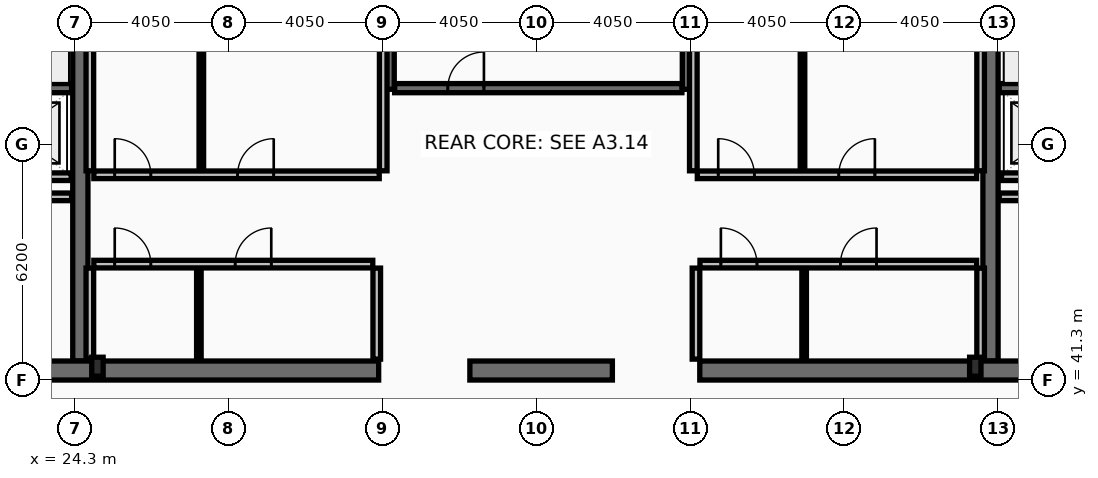
"""IFC4 building model, lengths in metres.
Left out: names, types, materials, properties, quantities, classifications, styles, units other than length and angle.
Written with IfcOpenShell. Run it as: python <this file> out.ifc"""

import sys

from ifc_helpers import new_model, si_unit, direction, frame, frame_2d, origin, origin_2d, place, context, subcontext, project, spatial, rectangle, i_section, extrude, element, fill, save


model = new_model("IFC4")
c1 = context("Model", 3, precision=1e-05, world=origin(), true_north=direction((0.0, 1.0)))
c2 = subcontext(c1, "Body", "Model", "MODEL_VIEW")
j1 = project(units=[si_unit("LENGTHUNIT", "METRE"), si_unit("PLANEANGLEUNIT", "RADIAN")], contexts=[c1])
p1 = place(None, origin())
s1 = spatial("IfcSite", under=j1, at=p1, CompositionType="ELEMENT")
p2 = place(p1, origin())
s2 = spatial("IfcBuilding", under=s1, at=p2, CompositionType="ELEMENT")
p3 = place(p2, frame((0.0, 0.0, 361.8)))
s3 = spatial("IfcBuildingStorey", under=s2, at=p3, CompositionType="ELEMENT", Elevation=361.8)
for number, where, z_axis, x_axis in (
    (1, (24.45, 41.8, 0.0), (0.0, 0.0, 1.0), (0.0, 1.0, 0.0)),
    (2, (48.4, 41.8, 0.0), (0.0, 0.0, 1.0), (0.0, 1.0, 0.0)),
):
    element("IfcWall", number, at=place(p3, frame(where, z_axis=z_axis, x_axis=x_axis)), inside=s3, PredefinedType="SHEAR", context=c2, shape_type="SweptSolid", body=[
        extrude(rectangle(XDim=11.4, YDim=0.4, at=frame_2d((5.7, 0.0))), origin(), (0.0, 0.0, 1.0), 5.4),
    ])
p4 = place(p3, frame((32.3, 41.55, 0.0), z_axis=(0.0, 0.0, 1.0), x_axis=(-1.0, 0.0, 0.0)))
e3 = element("IfcWall", 3, at=p4, inside=s3, PredefinedType="SHEAR", context=c2, shape_type="SweptSolid", body=[
    extrude(rectangle(XDim=11.45, YDim=0.5, at=frame_2d((5.725, 0.0))), origin(), (0.0, 0.0, 1.0), 5.4),
])
p5 = place(p3, frame((38.45, 41.55, 0.0), z_axis=(0.0, 0.0, 1.0), x_axis=(-1.0, 0.0, 0.0)))
e4 = element("IfcWall", 4, at=p5, inside=s3, PredefinedType="SHEAR", context=c2, shape_type="SweptSolid", body=[
    extrude(rectangle(XDim=3.75, YDim=0.5, at=frame_2d((1.875, 0.0))), origin(), (0.0, 0.0, 1.0), 5.4),
])
p6 = place(p3, frame((52.05, 41.55, 0.0), z_axis=(0.0, 0.0, 1.0), x_axis=(-1.0, 0.0, 0.0)))
e5 = element("IfcWall", 5, at=p6, inside=s3, PredefinedType="SHEAR", context=c2, shape_type="SweptSolid", body=[
    extrude(rectangle(XDim=11.3, YDim=0.5, at=frame_2d((5.65, 0.0))), origin(), (0.0, 0.0, 1.0), 5.4),
])
for number, where, z_axis, x_axis in (
    (6, (32.58, 48.95, 0.0), (0.0, 0.0, 1.0), (0.0, 1.0, 0.0)),
    (7, (40.42, 48.95, 0.0), (0.0, 0.0, 1.0), (0.0, 1.0, 0.0)),
):
    element("IfcWall", number, at=place(p3, frame(where, z_axis=z_axis, x_axis=x_axis)), inside=s3, PredefinedType="SHEAR", context=c2, shape_type="SweptSolid", body=[
        extrude(rectangle(XDim=4.25, YDim=0.26, at=frame_2d((2.125, 0.0))), origin(), (0.0, 0.0, 1.0), 5.4),
    ])
p7 = place(p3, frame((16.7, 48.98, 0.0), z_axis=(0.0, 0.0, 1.0), x_axis=(1.0, 0.0, 0.0)))
e8 = element("IfcWall", 8, at=p7, inside=s3, PredefinedType="SHEAR", context=c2, shape_type="SweptSolid", body=[
    extrude(rectangle(XDim=7.52, YDim=0.24, at=frame_2d((3.76, 0.0))), origin(), (0.0, 0.0, 1.0), 5.4),
])
p8 = place(p7, frame((0.22, 0.0, 0.0)))
e9 = element("IfcOpeningElement", 9, at=p8, cuts=e8, PredefinedType="OPENING", context=c2, shape_type="SweptSolid", body=[
    extrude(rectangle(XDim=1.05, YDim=2.15, at=frame_2d((0.525, 1.075))), frame((0.0, 0.13, 0.0), z_axis=(0.0, -1.0, 0.0), x_axis=(1.0, 0.0, 0.0)), (0.0, 0.0, 1.0), 0.26),
])
p9 = place(p3, frame((48.63, 48.98, 0.0), z_axis=(0.0, 0.0, 1.0), x_axis=(1.0, 0.0, 0.0)))
e10 = element("IfcWall", 10, at=p9, inside=s3, PredefinedType="SHEAR", context=c2, shape_type="SweptSolid", body=[
    extrude(rectangle(XDim=7.57, YDim=0.24, at=frame_2d((3.785, 0.0))), origin(), (0.0, 0.0, 1.0), 5.4),
])
p10 = place(p9, frame((6.3, 0.0, 0.0)))
e11 = element("IfcOpeningElement", 11, at=p10, cuts=e10, PredefinedType="OPENING", context=c2, shape_type="SweptSolid", body=[
    extrude(rectangle(XDim=1.05, YDim=2.15, at=frame_2d((0.525, 1.075))), frame((0.0, 0.13, 0.0), z_axis=(0.0, -1.0, 0.0), x_axis=(1.0, 0.0, 0.0)), (0.0, 0.0, 1.0), 0.26),
])
p11 = place(p3, frame((32.72, 48.98, 0.0), z_axis=(0.0, 0.0, 1.0), x_axis=(1.0, 0.0, 0.0)))
e12 = element("IfcWall", 12, at=p11, inside=s3, PredefinedType="SHEAR", context=c2, shape_type="SweptSolid", body=[
    extrude(rectangle(XDim=7.56, YDim=0.24, at=frame_2d((3.78, 0.0))), origin(), (0.0, 0.0, 1.0), 5.4),
])
p12 = place(p11, frame((1.4, 0.0, 0.0)))
e13 = element("IfcOpeningElement", 13, at=p12, cuts=e12, PredefinedType="OPENING", context=c2, shape_type="SweptSolid", body=[
    extrude(rectangle(XDim=0.95, YDim=2.1, at=frame_2d((0.475, 1.05))), frame((0.0, 0.13, 0.0), z_axis=(0.0, -1.0, 0.0), x_axis=(1.0, 0.0, 0.0)), (0.0, 0.0, 1.0), 0.26),
])
for number, where, z_axis, x_axis in (
    (14, (24.9, 41.65, 0.0), (0.0, 0.0, 1.0), (1.0, 0.0, 0.0)),
    (15, (48.0, 41.65, 0.0), (0.0, 0.0, 1.0), (1.0, 0.0, 0.0)),
):
    element("IfcColumn", number, at=place(p3, frame(where, z_axis=z_axis, x_axis=x_axis)), inside=s3, PredefinedType="COLUMN", context=c2, shape_type="SweptSolid", body=[
        extrude(i_section(OverallWidth=0.3, OverallDepth=0.5, WebThickness=0.014, FlangeThickness=0.028, at=origin_2d()), origin(), (0.0, 0.0, 1.0), 5.6),
    ])
p13 = place(p3, frame((51.61, 46.65, 0.0), z_axis=(0.0, 0.0, 1.0), x_axis=(-1.0, 0.0, 0.0)))
e16 = element("IfcWall", 16, at=p13, inside=s3, PredefinedType="PARTITIONING", context=c2, shape_type="SweptSolid", body=[
    extrude(rectangle(XDim=2.92, YDim=0.2, at=frame_2d((1.46, 0.0))), origin(), (0.0, 0.0, 1.0), 5.4),
])
p14 = place(p13, frame((0.86, 0.0, 0.0)))
e17 = element("IfcOpeningElement", 17, at=p14, cuts=e16, PredefinedType="OPENING", context=c2, shape_type="SweptSolid", body=[
    extrude(rectangle(XDim=1.2, YDim=2.18, at=frame_2d((0.6, 1.09))), frame((0.0, 0.11, 0.0), z_axis=(0.0, -1.0, 0.0), x_axis=(1.0, 0.0, 0.0)), (0.0, 0.0, 1.0), 0.22),
])
p15 = place(p3, frame((24.21, 46.65, 0.0), z_axis=(0.0, 0.0, 1.0), x_axis=(-1.0, 0.0, 0.0)))
e18 = element("IfcWall", 18, at=p15, inside=s3, PredefinedType="PARTITIONING", context=c2, shape_type="SweptSolid", body=[
    extrude(rectangle(XDim=2.97, YDim=0.2, at=frame_2d((1.485, 0.0))), origin(), (0.0, 0.0, 1.0), 5.4),
])
p16 = place(p15, frame((0.91, 0.0, 0.0)))
e19 = element("IfcOpeningElement", 19, at=p16, cuts=e18, PredefinedType="OPENING", context=c2, shape_type="SweptSolid", body=[
    extrude(rectangle(XDim=1.2, YDim=2.18, at=frame_2d((0.6, 1.09))), frame((0.0, 0.11, 0.0), z_axis=(0.0, -1.0, 0.0), x_axis=(1.0, 0.0, 0.0)), (0.0, 0.0, 1.0), 0.22),
])
p17 = place(p3, frame((21.2, 46.12, 0.0), z_axis=(0.0, 0.0, 1.0), x_axis=(1.0, 0.0, 0.0)))
e20 = element("IfcWall", 20, at=p17, inside=s3, PredefinedType="PARTITIONING", context=c2, shape_type="SweptSolid", body=[
    extrude(rectangle(XDim=3.02, YDim=0.2, at=frame_2d((1.51, 0.0))), origin(), (0.0, 0.0, 1.0), 5.4),
])
p18 = place(p3, frame((48.63, 46.12, 0.0), z_axis=(0.0, 0.0, 1.0), x_axis=(1.0, 0.0, 0.0)))
e21 = element("IfcWall", 21, at=p18, inside=s3, PredefinedType="PARTITIONING", context=c2, shape_type="SweptSolid", body=[
    extrude(rectangle(XDim=3.07, YDim=0.2, at=frame_2d((1.535, 0.0))), origin(), (0.0, 0.0, 1.0), 5.4),
])
for number, where, z_axis, x_axis in (
    (22, (24.7, 46.805, 0.0), (0.0, 0.0, 1.0), (0.0, 1.0, 0.0)),
    (23, (32.42, 46.805, 0.0), (0.0, 0.0, 1.0), (0.0, 1.0, 0.0)),
):
    element("IfcWall", number, at=place(p3, frame(where, z_axis=z_axis, x_axis=x_axis)), inside=s3, PredefinedType="PARTITIONING", context=c2, shape_type="SweptSolid", body=[
        extrude(rectangle(XDim=5.99, YDim=0.2, at=frame_2d((2.995, 0.0))), origin(), (0.0, 0.0, 1.0), 5.4),
    ])
p19 = place(p3, frame((27.634, 46.805, 0.0), z_axis=(0.0, 0.0, 1.0), x_axis=(0.0, 1.0, 0.0)))
e24 = element("IfcWall", 24, at=p19, inside=s3, PredefinedType="PARTITIONING", context=c2, shape_type="SweptSolid", body=[
    extrude(rectangle(XDim=5.99, YDim=0.12, at=frame_2d((2.995, 0.0))), origin(), (0.0, 0.0, 1.0), 5.4),
])
p20 = place(p3, frame((24.805, 46.7, 0.0), z_axis=(0.0, 0.0, 1.0), x_axis=(1.0, 0.0, 0.0)))
e25 = element("IfcWall", 25, at=p20, inside=s3, PredefinedType="PARTITIONING", context=c2, shape_type="SweptSolid", body=[
    extrude(rectangle(XDim=7.51, YDim=0.2, at=frame_2d((3.755, 0.0))), origin(), (0.0, 0.0, 1.0), 5.4),
])
p21 = place(p20, frame((0.55, 0.0, 0.0)))
e26 = element("IfcOpeningElement", 26, at=p21, cuts=e25, PredefinedType="OPENING", context=c2, shape_type="SweptSolid", body=[
    extrude(rectangle(XDim=0.95, YDim=2.1, at=frame_2d((0.475, 1.05))), frame((0.0, 0.11, 0.0), z_axis=(0.0, -1.0, 0.0), x_axis=(1.0, 0.0, 0.0)), (0.0, 0.0, 1.0), 0.22),
])
p22 = place(p20, frame((3.784, 0.0, 0.0)))
e27 = element("IfcOpeningElement", 27, at=p22, cuts=e25, PredefinedType="OPENING", context=c2, shape_type="SweptSolid", body=[
    extrude(rectangle(XDim=0.95, YDim=2.1, at=frame_2d((0.475, 1.05))), frame((0.0, 0.11, 0.0), z_axis=(0.0, -1.0, 0.0), x_axis=(1.0, 0.0, 0.0)), (0.0, 0.0, 1.0), 0.22),
])
for number, where, z_axis, x_axis in (
    (28, (24.7, 41.85, 0.0), (0.0, 0.0, 1.0), (0.0, 1.0, 0.0)),
    (29, (32.25, 41.85, 0.0), (0.0, 0.0, 1.0), (0.0, 1.0, 0.0)),
):
    element("IfcWall", number, at=place(p3, frame(where, z_axis=z_axis, x_axis=x_axis)), inside=s3, PredefinedType="PARTITIONING", context=c2, shape_type="SweptSolid", body=[
        extrude(rectangle(XDim=2.395, YDim=0.2, at=frame_2d((1.198, 0.0))), origin(), (0.0, 0.0, 1.0), 5.4),
    ])
p23 = place(p3, frame((27.569, 41.85, 0.0), z_axis=(0.0, 0.0, 1.0), x_axis=(0.0, 1.0, 0.0)))
e30 = element("IfcWall", 30, at=p23, inside=s3, PredefinedType="PARTITIONING", context=c2, shape_type="SweptSolid", body=[
    extrude(rectangle(XDim=2.395, YDim=0.12, at=frame_2d((1.198, 0.0))), origin(), (0.0, 0.0, 1.0), 5.4),
])
p24 = place(p3, frame((24.805, 44.35, 0.0), z_axis=(0.0, 0.0, 1.0), x_axis=(1.0, 0.0, 0.0)))
e31 = element("IfcWall", 31, at=p24, inside=s3, PredefinedType="PARTITIONING", context=c2, shape_type="SweptSolid", body=[
    extrude(rectangle(XDim=7.34, YDim=0.2, at=frame_2d((3.67, 0.0))), origin(), (0.0, 0.0, 1.0), 5.4),
])
p25 = place(p24, frame((0.55, 0.0, 0.0)))
e32 = element("IfcOpeningElement", 32, at=p25, cuts=e31, PredefinedType="OPENING", context=c2, shape_type="SweptSolid", body=[
    extrude(rectangle(XDim=0.95, YDim=2.1, at=frame_2d((0.475, 1.05))), frame((0.0, 0.11, 0.0), z_axis=(0.0, -1.0, 0.0), x_axis=(1.0, 0.0, 0.0)), (0.0, 0.0, 1.0), 0.22),
])
p26 = place(p24, frame((3.719, 0.0, 0.0)))
e33 = element("IfcOpeningElement", 33, at=p26, cuts=e31, PredefinedType="OPENING", context=c2, shape_type="SweptSolid", body=[
    extrude(rectangle(XDim=0.95, YDim=2.1, at=frame_2d((0.475, 1.05))), frame((0.0, 0.11, 0.0), z_axis=(0.0, -1.0, 0.0), x_axis=(1.0, 0.0, 0.0)), (0.0, 0.0, 1.0), 0.22),
])
for number, where, z_axis, x_axis in (
    (34, (40.58, 46.805, 0.0), (0.0, 0.0, 1.0), (0.0, 1.0, 0.0)),
    (35, (48.14, 46.805, 0.0), (0.0, 0.0, 1.0), (0.0, 1.0, 0.0)),
):
    element("IfcWall", number, at=place(p3, frame(where, z_axis=z_axis, x_axis=x_axis)), inside=s3, PredefinedType="PARTITIONING", context=c2, shape_type="SweptSolid", body=[
        extrude(rectangle(XDim=5.99, YDim=0.2, at=frame_2d((2.995, 0.0))), origin(), (0.0, 0.0, 1.0), 5.4),
    ])
p27 = place(p3, frame((43.453, 46.805, 0.0), z_axis=(0.0, 0.0, 1.0), x_axis=(0.0, 1.0, 0.0)))
e36 = element("IfcWall", 36, at=p27, inside=s3, PredefinedType="PARTITIONING", context=c2, shape_type="SweptSolid", body=[
    extrude(rectangle(XDim=5.99, YDim=0.12, at=frame_2d((2.995, 0.0))), origin(), (0.0, 0.0, 1.0), 5.4),
])
p28 = place(p3, frame((40.685, 46.7, 0.0), z_axis=(0.0, 0.0, 1.0), x_axis=(1.0, 0.0, 0.0)))
e37 = element("IfcWall", 37, at=p28, inside=s3, PredefinedType="PARTITIONING", context=c2, shape_type="SweptSolid", body=[
    extrude(rectangle(XDim=7.35, YDim=0.2, at=frame_2d((3.675, 0.0))), origin(), (0.0, 0.0, 1.0), 5.4),
])
p29 = place(p28, frame((0.55, 0.0, 0.0)))
e38 = element("IfcOpeningElement", 38, at=p29, cuts=e37, PredefinedType="OPENING", context=c2, shape_type="SweptSolid", body=[
    extrude(rectangle(XDim=0.95, YDim=2.1, at=frame_2d((0.475, 1.05))), frame((0.0, 0.11, 0.0), z_axis=(0.0, -1.0, 0.0), x_axis=(1.0, 0.0, 0.0)), (0.0, 0.0, 1.0), 0.22),
])
p30 = place(p28, frame((3.723, 0.0, 0.0)))
e39 = element("IfcOpeningElement", 39, at=p30, cuts=e37, PredefinedType="OPENING", context=c2, shape_type="SweptSolid", body=[
    extrude(rectangle(XDim=0.95, YDim=2.1, at=frame_2d((0.475, 1.05))), frame((0.0, 0.11, 0.0), z_axis=(0.0, -1.0, 0.0), x_axis=(1.0, 0.0, 0.0)), (0.0, 0.0, 1.0), 0.22),
])
for number, where, z_axis, x_axis in (
    (40, (40.65, 41.85, 0.0), (0.0, 0.0, 1.0), (0.0, 1.0, 0.0)),
    (41, (48.14, 41.85, 0.0), (0.0, 0.0, 1.0), (0.0, 1.0, 0.0)),
):
    element("IfcWall", number, at=place(p3, frame(where, z_axis=z_axis, x_axis=x_axis)), inside=s3, PredefinedType="PARTITIONING", context=c2, shape_type="SweptSolid", body=[
        extrude(rectangle(XDim=2.395, YDim=0.2, at=frame_2d((1.198, 0.0))), origin(), (0.0, 0.0, 1.0), 5.4),
    ])
p31 = place(p3, frame((43.496, 41.85, 0.0), z_axis=(0.0, 0.0, 1.0), x_axis=(0.0, 1.0, 0.0)))
e42 = element("IfcWall", 42, at=p31, inside=s3, PredefinedType="PARTITIONING", context=c2, shape_type="SweptSolid", body=[
    extrude(rectangle(XDim=2.395, YDim=0.12, at=frame_2d((1.198, 0.0))), origin(), (0.0, 0.0, 1.0), 5.4),
])
p32 = place(p3, frame((40.755, 44.35, 0.0), z_axis=(0.0, 0.0, 1.0), x_axis=(1.0, 0.0, 0.0)))
e43 = element("IfcWall", 43, at=p32, inside=s3, PredefinedType="PARTITIONING", context=c2, shape_type="SweptSolid", body=[
    extrude(rectangle(XDim=7.28, YDim=0.2, at=frame_2d((3.64, 0.0))), origin(), (0.0, 0.0, 1.0), 5.4),
])
p33 = place(p32, frame((0.55, 0.0, 0.0)))
e44 = element("IfcOpeningElement", 44, at=p33, cuts=e43, PredefinedType="OPENING", context=c2, shape_type="SweptSolid", body=[
    extrude(rectangle(XDim=0.95, YDim=2.1, at=frame_2d((0.475, 1.05))), frame((0.0, 0.11, 0.0), z_axis=(0.0, -1.0, 0.0), x_axis=(1.0, 0.0, 0.0)), (0.0, 0.0, 1.0), 0.22),
])
p34 = place(p32, frame((3.696, 0.0, 0.0)))
e45 = element("IfcOpeningElement", 45, at=p34, cuts=e43, PredefinedType="OPENING", context=c2, shape_type="SweptSolid", body=[
    extrude(rectangle(XDim=0.95, YDim=2.1, at=frame_2d((0.475, 1.05))), frame((0.0, 0.11, 0.0), z_axis=(0.0, -1.0, 0.0), x_axis=(1.0, 0.0, 0.0)), (0.0, 0.0, 1.0), 0.22),
])
p35 = place(p12, origin())
e46 = element("IfcDoor", 46, at=p35, inside=s3, OperationType="SINGLE_SWING_RIGHT", PredefinedType="DOOR", context=c2, shape_type="SweptSolid", body=[
    extrude(rectangle(XDim=0.95, YDim=2.1, at=frame_2d((0.475, 1.05))), frame((0.0, 0.025, 0.0), z_axis=(0.0, -1.0, 0.0), x_axis=(1.0, 0.0, 0.0)), (0.0, 0.0, 1.0), 0.05),
])
fill(e13, e46)
p36 = place(p21, origin())
e47 = element("IfcDoor", 47, at=p36, inside=s3, OperationType="SINGLE_SWING_LEFT", PredefinedType="DOOR", context=c2, shape_type="SweptSolid", body=[
    extrude(rectangle(XDim=0.95, YDim=2.1, at=frame_2d((0.475, 1.05))), frame((0.0, 0.025, 0.0), z_axis=(0.0, -1.0, 0.0), x_axis=(1.0, 0.0, 0.0)), (0.0, 0.0, 1.0), 0.05),
])
fill(e26, e47)
p37 = place(p22, origin())
e48 = element("IfcDoor", 48, at=p37, inside=s3, OperationType="SINGLE_SWING_RIGHT", PredefinedType="DOOR", context=c2, shape_type="SweptSolid", body=[
    extrude(rectangle(XDim=0.95, YDim=2.1, at=frame_2d((0.475, 1.05))), frame((0.0, 0.025, 0.0), z_axis=(0.0, -1.0, 0.0), x_axis=(1.0, 0.0, 0.0)), (0.0, 0.0, 1.0), 0.05),
])
fill(e27, e48)
p38 = place(p25, origin())
e49 = element("IfcDoor", 49, at=p38, inside=s3, OperationType="SINGLE_SWING_LEFT", PredefinedType="DOOR", context=c2, shape_type="SweptSolid", body=[
    extrude(rectangle(XDim=0.95, YDim=2.1, at=frame_2d((0.475, 1.05))), frame((0.0, 0.025, 0.0), z_axis=(0.0, -1.0, 0.0), x_axis=(1.0, 0.0, 0.0)), (0.0, 0.0, 1.0), 0.05),
])
fill(e32, e49)
p39 = place(p26, origin())
e50 = element("IfcDoor", 50, at=p39, inside=s3, OperationType="SINGLE_SWING_RIGHT", PredefinedType="DOOR", context=c2, shape_type="SweptSolid", body=[
    extrude(rectangle(XDim=0.95, YDim=2.1, at=frame_2d((0.475, 1.05))), frame((0.0, 0.025, 0.0), z_axis=(0.0, -1.0, 0.0), x_axis=(1.0, 0.0, 0.0)), (0.0, 0.0, 1.0), 0.05),
])
fill(e33, e50)
p40 = place(p29, origin())
e51 = element("IfcDoor", 51, at=p40, inside=s3, OperationType="SINGLE_SWING_LEFT", PredefinedType="DOOR", context=c2, shape_type="SweptSolid", body=[
    extrude(rectangle(XDim=0.95, YDim=2.1, at=frame_2d((0.475, 1.05))), frame((0.0, 0.025, 0.0), z_axis=(0.0, -1.0, 0.0), x_axis=(1.0, 0.0, 0.0)), (0.0, 0.0, 1.0), 0.05),
])
fill(e38, e51)
p41 = place(p30, origin())
e52 = element("IfcDoor", 52, at=p41, inside=s3, OperationType="SINGLE_SWING_RIGHT", PredefinedType="DOOR", context=c2, shape_type="SweptSolid", body=[
    extrude(rectangle(XDim=0.95, YDim=2.1, at=frame_2d((0.475, 1.05))), frame((0.0, 0.025, 0.0), z_axis=(0.0, -1.0, 0.0), x_axis=(1.0, 0.0, 0.0)), (0.0, 0.0, 1.0), 0.05),
])
fill(e39, e52)
p42 = place(p33, origin())
e53 = element("IfcDoor", 53, at=p42, inside=s3, OperationType="SINGLE_SWING_LEFT", PredefinedType="DOOR", context=c2, shape_type="SweptSolid", body=[
    extrude(rectangle(XDim=0.95, YDim=2.1, at=frame_2d((0.475, 1.05))), frame((0.0, 0.025, 0.0), z_axis=(0.0, -1.0, 0.0), x_axis=(1.0, 0.0, 0.0)), (0.0, 0.0, 1.0), 0.05),
])
fill(e44, e53)
p43 = place(p34, origin())
e54 = element("IfcDoor", 54, at=p43, inside=s3, OperationType="SINGLE_SWING_RIGHT", PredefinedType="DOOR", context=c2, shape_type="SweptSolid", body=[
    extrude(rectangle(XDim=0.95, YDim=2.1, at=frame_2d((0.475, 1.05))), frame((0.0, 0.025, 0.0), z_axis=(0.0, -1.0, 0.0), x_axis=(1.0, 0.0, 0.0)), (0.0, 0.0, 1.0), 0.05),
])
fill(e45, e54)
save(model, sys.argv[1])
